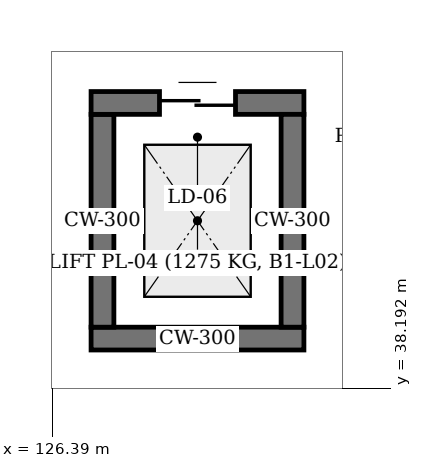
"""IFC4 building model, lengths in metres.
Left out: names, types, materials, properties, quantities, classifications, styles, units other than length and angle.
Written with IfcOpenShell. Run it as: python <this file> out.ifc"""

import sys

from ifc_helpers import new_model, si_unit, direction, frame, frame_2d, origin, place, context, subcontext, project, spatial, rectangle, extrude, element, fill, save


model = new_model("IFC4")
c1 = context("Model", 3, precision=1e-05, world=origin(), true_north=direction((0.0, 1.0)))
c2 = subcontext(c1, "Body", "Model", "MODEL_VIEW")
j1 = project(units=[si_unit("LENGTHUNIT", "METRE"), si_unit("PLANEANGLEUNIT", "RADIAN")], contexts=[c1])
p1 = place(None, origin())
s1 = spatial("IfcSite", under=j1, at=p1, CompositionType="ELEMENT")
p2 = place(p1, origin())
s2 = spatial("IfcBuilding", under=s1, at=p2, CompositionType="ELEMENT")
p3 = place(p2, frame((0.0, 0.0, -4.8)))
s3 = spatial("IfcBuildingStorey", under=s2, at=p3, CompositionType="ELEMENT", Elevation=-4.8)
for number, where, z_axis, x_axis in (
    (1, (129.7, 38.85, 0.0), (0.0, 0.0, 1.0), (-1.0, 0.0, 0.0)),
    (2, (127.05, 39.0, 0.0), (0.0, 0.0, 1.0), (0.0, 1.0, 0.0)),
):
    element("IfcWall", number, at=place(p3, frame(where, z_axis=z_axis, x_axis=x_axis)), inside=s3, PredefinedType="SOLIDWALL", context=c2, shape_type="SweptSolid", body=[
        extrude(rectangle(XDim=2.8, YDim=0.3, at=frame_2d((1.4, 0.0))), origin(), (0.0, 0.0, 1.0), 4.8),
    ])
p4 = place(p3, frame((126.9, 41.95, 0.0), z_axis=(0.0, 0.0, 1.0), x_axis=(1.0, 0.0, 0.0)))
e3 = element("IfcWall", 3, at=p4, inside=s3, PredefinedType="SOLIDWALL", context=c2, shape_type="SweptSolid", body=[
    extrude(rectangle(XDim=2.8, YDim=0.3, at=frame_2d((1.4, 0.0))), origin(), (0.0, 0.0, 1.0), 4.8),
])
p5 = place(p4, frame((0.9, 0.0, 0.0)))
e4 = element("IfcOpeningElement", 4, at=p5, cuts=e3, PredefinedType="OPENING", context=c2, shape_type="SweptSolid", body=[
    extrude(rectangle(XDim=1.0, YDim=2.15, at=frame_2d((0.5, 1.075))), frame((0.0, 0.17, 0.0), z_axis=(0.0, -1.0, 0.0), x_axis=(1.0, 0.0, 0.0)), (0.0, 0.0, 1.0), 0.34),
])
p6 = place(p3, frame((129.55, 41.8, 0.0), z_axis=(0.0, 0.0, 1.0), x_axis=(0.0, -1.0, 0.0)))
e5 = element("IfcWall", 5, at=p6, inside=s3, PredefinedType="SOLIDWALL", context=c2, shape_type="SweptSolid", body=[
    extrude(rectangle(XDim=2.8, YDim=0.3, at=frame_2d((1.4, 0.0))), origin(), (0.0, 0.0, 1.0), 4.8),
])
p7 = place(p5, origin())
e6 = element("IfcDoor", 6, at=p7, inside=s3, OperationType="DOUBLE_DOOR_SLIDING", PredefinedType="DOOR", context=c2, shape_type="SweptSolid", body=[
    extrude(rectangle(XDim=1.0, YDim=2.15, at=frame_2d((0.5, 1.075))), frame((0.0, 0.025, 0.0), z_axis=(0.0, -1.0, 0.0), x_axis=(1.0, 0.0, 0.0)), (0.0, 0.0, 1.0), 0.05),
])
fill(e4, e6)
save(model, sys.argv[1])
